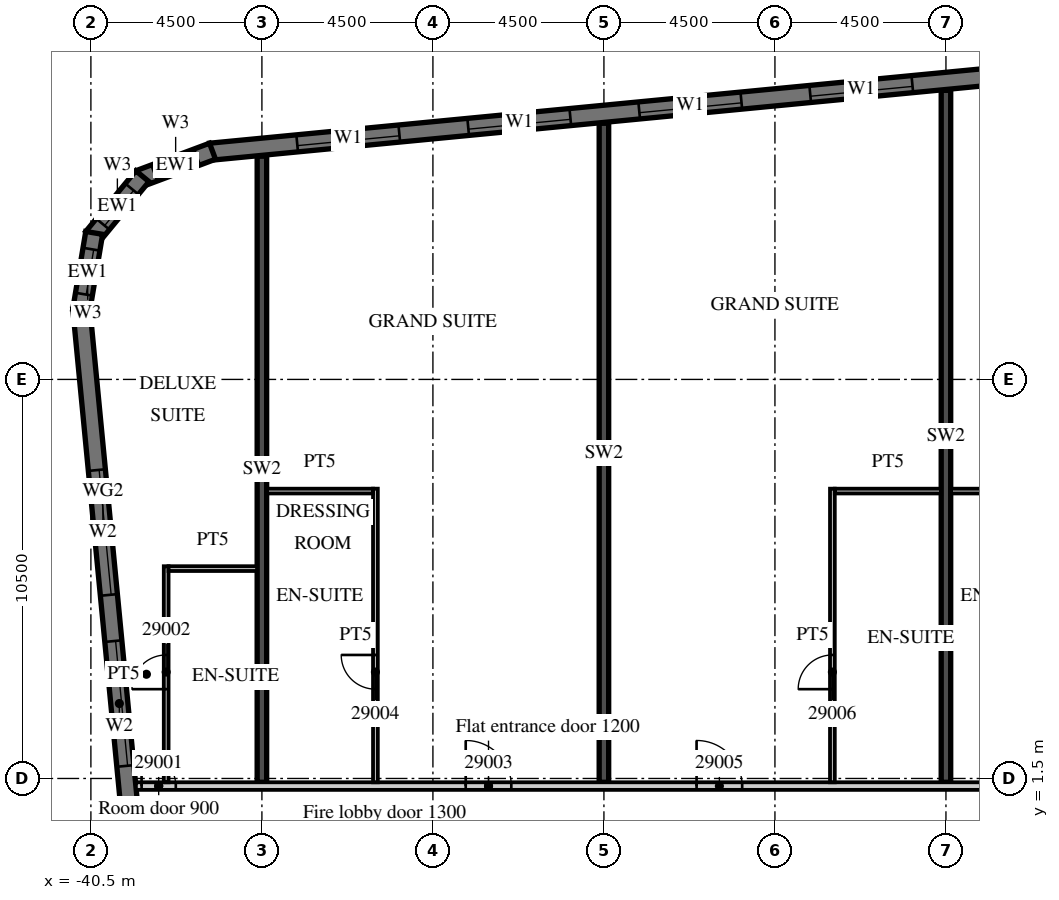
"""IFC4 building model, lengths in metres.
Left out: names, types, materials, properties, quantities, classifications, styles, units other than length and angle.
Written with IfcOpenShell. Run it as: python <this file> out.ifc"""

import sys

from ifc_helpers import new_model, si_unit, direction, frame, frame_2d, origin, place, context, subcontext, project, spatial, polyline, rectangle, outline, extrude, element, fill, save


model = new_model("IFC4")
c1 = context("Model", 3, precision=1e-05, world=origin(), true_north=direction((0.0, 1.0)))
c2 = subcontext(c1, "Body", "Model", "MODEL_VIEW")
j1 = project(units=[si_unit("LENGTHUNIT", "METRE"), si_unit("PLANEANGLEUNIT", "RADIAN")], contexts=[c1])
p1 = place(None, origin())
s1 = spatial("IfcSite", under=j1, at=p1, CompositionType="ELEMENT")
p2 = place(p1, origin())
s2 = spatial("IfcBuilding", under=s1, at=p2, CompositionType="ELEMENT")
p3 = place(p2, frame((0.0, 0.0, 130.6)))
s3 = spatial("IfcBuildingStorey", under=s2, at=p3, CompositionType="ELEMENT", Elevation=130.6)
p4 = place(p3, frame((-36.0, 1.4, 0.0), z_axis=(0.0, 0.0, 1.0), x_axis=(0.0, 1.0, 0.0)))
e1 = element("IfcWall", 1, at=p4, inside=s3, PredefinedType="SHEAR", context=c2, shape_type="SweptSolid", body=[
    extrude(rectangle(XDim=16.474, YDim=0.25, at=frame_2d((8.237, 0.0))), origin(), (0.0, 0.0, 1.0), 3.3),
])
p5 = place(p3, frame((-27.0, 1.4, 0.0), z_axis=(0.0, 0.0, 1.0), x_axis=(0.0, 1.0, 0.0)))
e2 = element("IfcWall", 2, at=p5, inside=s3, PredefinedType="SHEAR", context=c2, shape_type="SweptSolid", body=[
    extrude(rectangle(XDim=17.34, YDim=0.25, at=frame_2d((8.67, 0.0))), origin(), (0.0, 0.0, 1.0), 3.3),
])
p6 = place(p3, frame((-18.0, 1.4, 0.0), z_axis=(0.0, 0.0, 1.0), x_axis=(0.0, 1.0, 0.0)))
e3 = element("IfcWall", 3, at=p6, inside=s3, PredefinedType="SHEAR", context=c2, shape_type="SweptSolid", body=[
    extrude(rectangle(XDim=18.207, YDim=0.25, at=frame_2d((9.104, 0.0))), origin(), (0.0, 0.0, 1.0), 3.3),
])
p7 = place(p3, frame((-40.753, 13.872, 0.0), z_axis=(0.0, 0.0, 1.0), x_axis=(0.095843327381, -0.995396431878, 0.0)))
e4 = element("IfcWall", 4, at=p7, inside=s3, PredefinedType="SOLIDWALL", context=c2, shape_type="SweptSolid", body=[
    extrude(rectangle(XDim=35.0, YDim=0.45, at=frame_2d((17.5, 0.0))), origin(), (0.0, 0.0, 1.0), 3.02),
])
p8 = place(p7, frame((4.277, 0.0, 0.45)))
e5 = element("IfcOpeningElement", 5, at=p8, cuts=e4, PredefinedType="OPENING", context=c2, shape_type="SweptSolid", body=[
    extrude(rectangle(XDim=3.3, YDim=2.25, at=frame_2d((1.65, 1.125))), frame((0.0, 0.235, 0.0), z_axis=(0.0, -1.0, 0.0), x_axis=(1.0, 0.0, 0.0)), (0.0, 0.0, 1.0), 0.47),
])
p9 = place(p7, frame((8.798, 0.0, 0.45)))
e6 = element("IfcOpeningElement", 6, at=p9, cuts=e4, PredefinedType="OPENING", context=c2, shape_type="SweptSolid", body=[
    extrude(rectangle(XDim=3.3, YDim=2.25, at=frame_2d((1.65, 1.125))), frame((0.0, 0.235, 0.0), z_axis=(0.0, -1.0, 0.0), x_axis=(1.0, 0.0, 0.0)), (0.0, 0.0, 1.0), 0.47),
])
p10 = place(p3, frame((13.521, 22.89, 0.0), z_axis=(0.0, 0.0, 1.0), x_axis=(-0.995396445054, -0.095843190545, 0.0)))
e7 = element("IfcWall", 7, at=p10, inside=s3, PredefinedType="SOLIDWALL", context=c2, shape_type="SweptSolid", body=[
    extrude(rectangle(XDim=51.114, YDim=0.45, at=frame_2d((25.557, 0.0))), origin(), (0.0, 0.0, 1.0), 3.02),
])
p11 = place(p10, frame((0.91, 0.0, 0.45)))
e8 = element("IfcOpeningElement", 8, at=p11, cuts=e7, PredefinedType="OPENING", context=c2, shape_type="SweptSolid", body=[
    extrude(rectangle(XDim=2.7, YDim=2.25, at=frame_2d((1.35, 1.125))), frame((0.0, 0.235, 0.0), z_axis=(0.0, -1.0, 0.0), x_axis=(1.0, 0.0, 0.0)), (0.0, 0.0, 1.0), 0.47),
])
p12 = place(p10, frame((5.431, 0.0, 0.45)))
e9 = element("IfcOpeningElement", 9, at=p12, cuts=e7, PredefinedType="OPENING", context=c2, shape_type="SweptSolid", body=[
    extrude(rectangle(XDim=2.7, YDim=2.25, at=frame_2d((1.35, 1.125))), frame((0.0, 0.235, 0.0), z_axis=(0.0, -1.0, 0.0), x_axis=(1.0, 0.0, 0.0)), (0.0, 0.0, 1.0), 0.47),
])
p13 = place(p10, frame((9.952, 0.0, 0.45)))
e10 = element("IfcOpeningElement", 10, at=p13, cuts=e7, PredefinedType="OPENING", context=c2, shape_type="SweptSolid", body=[
    extrude(rectangle(XDim=2.7, YDim=2.25, at=frame_2d((1.35, 1.125))), frame((0.0, 0.235, 0.0), z_axis=(0.0, -1.0, 0.0), x_axis=(1.0, 0.0, 0.0)), (0.0, 0.0, 1.0), 0.47),
])
p14 = place(p10, frame((14.473, 0.0, 0.45)))
e11 = element("IfcOpeningElement", 11, at=p14, cuts=e7, PredefinedType="OPENING", context=c2, shape_type="SweptSolid", body=[
    extrude(rectangle(XDim=2.7, YDim=2.25, at=frame_2d((1.35, 1.125))), frame((0.0, 0.235, 0.0), z_axis=(0.0, -1.0, 0.0), x_axis=(1.0, 0.0, 0.0)), (0.0, 0.0, 1.0), 0.47),
])
p15 = place(p10, frame((18.994, 0.0, 0.45)))
e12 = element("IfcOpeningElement", 12, at=p15, cuts=e7, PredefinedType="OPENING", context=c2, shape_type="SweptSolid", body=[
    extrude(rectangle(XDim=2.7, YDim=2.25, at=frame_2d((1.35, 1.125))), frame((0.0, 0.235, 0.0), z_axis=(0.0, -1.0, 0.0), x_axis=(1.0, 0.0, 0.0)), (0.0, 0.0, 1.0), 0.47),
])
p16 = place(p10, frame((23.514, 0.0, 0.45)))
e13 = element("IfcOpeningElement", 13, at=p16, cuts=e7, PredefinedType="OPENING", context=c2, shape_type="SweptSolid", body=[
    extrude(rectangle(XDim=2.7, YDim=2.25, at=frame_2d((1.35, 1.125))), frame((0.0, 0.235, 0.0), z_axis=(0.0, -1.0, 0.0), x_axis=(1.0, 0.0, 0.0)), (0.0, 0.0, 1.0), 0.47),
])
p17 = place(p10, frame((28.035, 0.0, 0.45)))
e14 = element("IfcOpeningElement", 14, at=p17, cuts=e7, PredefinedType="OPENING", context=c2, shape_type="SweptSolid", body=[
    extrude(rectangle(XDim=2.7, YDim=2.25, at=frame_2d((1.35, 1.125))), frame((0.0, 0.235, 0.0), z_axis=(0.0, -1.0, 0.0), x_axis=(1.0, 0.0, 0.0)), (0.0, 0.0, 1.0), 0.47),
])
p18 = place(p10, frame((32.556, 0.0, 0.45)))
e15 = element("IfcOpeningElement", 15, at=p18, cuts=e7, PredefinedType="OPENING", context=c2, shape_type="SweptSolid", body=[
    extrude(rectangle(XDim=2.7, YDim=2.25, at=frame_2d((1.35, 1.125))), frame((0.0, 0.235, 0.0), z_axis=(0.0, -1.0, 0.0), x_axis=(1.0, 0.0, 0.0)), (0.0, 0.0, 1.0), 0.47),
])
p19 = place(p10, frame((37.077, 0.0, 0.45)))
e16 = element("IfcOpeningElement", 16, at=p19, cuts=e7, PredefinedType="OPENING", context=c2, shape_type="SweptSolid", body=[
    extrude(rectangle(XDim=2.7, YDim=2.25, at=frame_2d((1.35, 1.125))), frame((0.0, 0.235, 0.0), z_axis=(0.0, -1.0, 0.0), x_axis=(1.0, 0.0, 0.0)), (0.0, 0.0, 1.0), 0.47),
])
p20 = place(p10, frame((41.598, 0.0, 0.45)))
e17 = element("IfcOpeningElement", 17, at=p20, cuts=e7, PredefinedType="OPENING", context=c2, shape_type="SweptSolid", body=[
    extrude(rectangle(XDim=2.7, YDim=2.25, at=frame_2d((1.35, 1.125))), frame((0.0, 0.235, 0.0), z_axis=(0.0, -1.0, 0.0), x_axis=(1.0, 0.0, 0.0)), (0.0, 0.0, 1.0), 0.47),
])
p21 = place(p10, frame((46.118, 0.0, 0.45)))
e18 = element("IfcOpeningElement", 18, at=p21, cuts=e7, PredefinedType="OPENING", context=c2, shape_type="SweptSolid", body=[
    extrude(rectangle(XDim=2.7, YDim=2.25, at=frame_2d((1.35, 1.125))), frame((0.0, 0.235, 0.0), z_axis=(0.0, -1.0, 0.0), x_axis=(1.0, 0.0, 0.0)), (0.0, 0.0, 1.0), 0.47),
])
p22 = place(p3, frame((-37.3, 18.004, 0.0), z_axis=(0.0, 0.0, 1.0), x_axis=(-0.936677599948, -0.350192909346, 0.0)))
e19 = element("IfcWall", 19, at=p22, inside=s3, PredefinedType="SOLIDWALL", context=c2, shape_type="SweptSolid", body=[
    extrude(outline(polyline([(0.0, -0.225), (2.071, -0.225), (1.95, 0.225), (0.121, 0.225), (0.0, -0.225)])), origin(), (0.0, 0.0, 1.0), 3.02),
])
p23 = place(p22, frame((0.435, 0.0, 0.45)))
e20 = element("IfcOpeningElement", 20, at=p23, cuts=e19, PredefinedType="OPENING", context=c2, shape_type="SweptSolid", body=[
    extrude(rectangle(XDim=1.2, YDim=2.25, at=frame_2d((0.6, 1.125))), frame((0.0, 0.235, 0.0), z_axis=(0.0, -1.0, 0.0), x_axis=(1.0, 0.0, 0.0)), (0.0, 0.0, 1.0), 0.47),
])
p24 = place(p3, frame((-39.145, 17.347, 0.0), z_axis=(0.0, 0.0, 1.0), x_axis=(-0.636046112757, -0.771651049663, 0.0)))
e21 = element("IfcWall", 21, at=p24, inside=s3, PredefinedType="SOLIDWALL", context=c2, shape_type="SweptSolid", body=[
    extrude(outline(polyline([(0.0, -0.225), (2.071, -0.225), (1.95, 0.225), (0.121, 0.225), (0.0, -0.225)])), origin(), (0.0, 0.0, 1.0), 3.02),
])
p25 = place(p24, frame((0.435, 0.0, 0.45)))
e22 = element("IfcOpeningElement", 22, at=p25, cuts=e21, PredefinedType="OPENING", context=c2, shape_type="SweptSolid", body=[
    extrude(rectangle(XDim=1.2, YDim=2.25, at=frame_2d((0.6, 1.125))), frame((0.0, 0.235, 0.0), z_axis=(0.0, -1.0, 0.0), x_axis=(1.0, 0.0, 0.0)), (0.0, 0.0, 1.0), 0.47),
])
p26 = place(p3, frame((-40.413, 15.855, 0.0), z_axis=(0.0, 0.0, 1.0), x_axis=(-0.165068144653, -0.986282164302, 0.0)))
e23 = element("IfcWall", 23, at=p26, inside=s3, PredefinedType="SOLIDWALL", context=c2, shape_type="SweptSolid", body=[
    extrude(outline(polyline([(0.0, -0.225), (2.071, -0.225), (1.95, 0.225), (0.121, 0.225), (0.0, -0.225)])), origin(), (0.0, 0.0, 1.0), 3.02),
])
p27 = place(p26, frame((0.435, 0.0, 0.45)))
e24 = element("IfcOpeningElement", 24, at=p27, cuts=e23, PredefinedType="OPENING", context=c2, shape_type="SweptSolid", body=[
    extrude(rectangle(XDim=1.2, YDim=2.25, at=frame_2d((0.6, 1.125))), frame((0.0, 0.235, 0.0), z_axis=(0.0, -1.0, 0.0), x_axis=(1.0, 0.0, 0.0)), (0.0, 0.0, 1.0), 0.47),
])
p28 = place(p3, frame((-39.316, 1.3, 0.0), z_axis=(0.0, 0.0, 1.0), x_axis=(1.0, 0.0, 0.0)))
e25 = element("IfcWall", 25, at=p28, inside=s3, PredefinedType="PARTITIONING", context=c2, shape_type="SweptSolid", body=[
    extrude(rectangle(XDim=52.816, YDim=0.2, at=frame_2d((26.408, 0.0))), origin(), (0.0, 0.0, 1.0), 3.02),
])
p29 = place(p28, frame((0.15, 0.0, 0.0)))
e26 = element("IfcOpeningElement", 26, at=p29, cuts=e25, PredefinedType="OPENING", context=c2, shape_type="SweptSolid", body=[
    extrude(rectangle(XDim=0.9, YDim=2.1, at=frame_2d((0.45, 1.05))), frame((0.0, 0.11, 0.0), z_axis=(0.0, -1.0, 0.0), x_axis=(1.0, 0.0, 0.0)), (0.0, 0.0, 1.0), 0.22),
])
p30 = place(p28, frame((8.679, 0.0, 0.0)))
e27 = element("IfcOpeningElement", 27, at=p30, cuts=e25, PredefinedType="OPENING", context=c2, shape_type="SweptSolid", body=[
    extrude(rectangle(XDim=1.2, YDim=2.1, at=frame_2d((0.6, 1.05))), frame((0.0, 0.11, 0.0), z_axis=(0.0, -1.0, 0.0), x_axis=(1.0, 0.0, 0.0)), (0.0, 0.0, 1.0), 0.22),
])
p31 = place(p28, frame((14.754, 0.0, 0.0)))
e28 = element("IfcOpeningElement", 28, at=p31, cuts=e25, PredefinedType="OPENING", context=c2, shape_type="SweptSolid", body=[
    extrude(rectangle(XDim=1.2, YDim=2.1, at=frame_2d((0.6, 1.05))), frame((0.0, 0.11, 0.0), z_axis=(0.0, -1.0, 0.0), x_axis=(1.0, 0.0, 0.0)), (0.0, 0.0, 1.0), 0.22),
])
p32 = place(p28, frame((26.678, 0.0, 0.0)))
e29 = element("IfcOpeningElement", 29, at=p32, cuts=e25, PredefinedType="OPENING", context=c2, shape_type="SweptSolid", body=[
    extrude(rectangle(XDim=1.2, YDim=2.1, at=frame_2d((0.6, 1.05))), frame((0.0, 0.11, 0.0), z_axis=(0.0, -1.0, 0.0), x_axis=(1.0, 0.0, 0.0)), (0.0, 0.0, 1.0), 0.22),
])
p33 = place(p28, frame((33.266, 0.0, 0.0)))
e30 = element("IfcOpeningElement", 30, at=p33, cuts=e25, PredefinedType="OPENING", context=c2, shape_type="SweptSolid", body=[
    extrude(rectangle(XDim=1.0, YDim=2.1, at=frame_2d((0.5, 1.05))), frame((0.0, 0.11, 0.0), z_axis=(0.0, -1.0, 0.0), x_axis=(1.0, 0.0, 0.0)), (0.0, 0.0, 1.0), 0.22),
])
p34 = place(p28, frame((37.741, 0.0, 0.0)))
e31 = element("IfcOpeningElement", 31, at=p34, cuts=e25, PredefinedType="OPENING", context=c2, shape_type="SweptSolid", body=[
    extrude(rectangle(XDim=1.0, YDim=2.1, at=frame_2d((0.5, 1.05))), frame((0.0, 0.11, 0.0), z_axis=(0.0, -1.0, 0.0), x_axis=(1.0, 0.0, 0.0)), (0.0, 0.0, 1.0), 0.22),
])
p35 = place(p28, frame((41.754, 0.0, 0.0)))
e32 = element("IfcOpeningElement", 32, at=p35, cuts=e25, PredefinedType="OPENING", context=c2, shape_type="SweptSolid", body=[
    extrude(rectangle(XDim=1.2, YDim=2.1, at=frame_2d((0.6, 1.05))), frame((0.0, 0.11, 0.0), z_axis=(0.0, -1.0, 0.0), x_axis=(1.0, 0.0, 0.0)), (0.0, 0.0, 1.0), 0.22),
])
p36 = place(p28, frame((51.241, 0.0, 0.0)))
e33 = element("IfcOpeningElement", 33, at=p36, cuts=e25, PredefinedType="OPENING", context=c2, shape_type="SweptSolid", body=[
    extrude(rectangle(XDim=1.0, YDim=2.1, at=frame_2d((0.5, 1.05))), frame((0.0, 0.11, 0.0), z_axis=(0.0, -1.0, 0.0), x_axis=(1.0, 0.0, 0.0)), (0.0, 0.0, 1.0), 0.22),
])
p37 = place(p3, frame((-38.519, 1.4, 0.0), z_axis=(0.0, 0.0, 1.0), x_axis=(0.0, 1.0, 0.0)))
e34 = element("IfcWall", 34, at=p37, inside=s3, PredefinedType="PARTITIONING", context=c2, shape_type="SweptSolid", body=[
    extrude(rectangle(XDim=5.684, YDim=0.125, at=frame_2d((2.842, 0.0))), origin(), (0.0, 0.0, 1.0), 3.02),
])
p38 = place(p37, frame((2.45, 0.0, 0.0)))
e35 = element("IfcOpeningElement", 35, at=p38, cuts=e34, PredefinedType="OPENING", context=c2, shape_type="SweptSolid", body=[
    extrude(rectangle(XDim=0.9, YDim=2.1, at=frame_2d((0.45, 1.05))), frame((0.0, 0.073, 0.0), z_axis=(0.0, -1.0, 0.0), x_axis=(1.0, 0.0, 0.0)), (0.0, 0.0, 1.0), 0.145),
])
p39 = place(p3, frame((-38.457, 7.022, 0.0), z_axis=(0.0, 0.0, 1.0), x_axis=(1.0, 0.0, 0.0)))
e36 = element("IfcWall", 36, at=p39, inside=s3, PredefinedType="PARTITIONING", context=c2, shape_type="SweptSolid", body=[
    extrude(rectangle(XDim=2.332, YDim=0.125, at=frame_2d((1.166, 0.0))), origin(), (0.0, 0.0, 1.0), 3.02),
])
p40 = place(p3, frame((-33.013, 1.4, 0.0), z_axis=(0.0, 0.0, 1.0), x_axis=(0.0, 1.0, 0.0)))
e37 = element("IfcWall", 37, at=p40, inside=s3, PredefinedType="PARTITIONING", context=c2, shape_type="SweptSolid", body=[
    extrude(rectangle(XDim=7.725, YDim=0.125, at=frame_2d((3.863, 0.0))), origin(), (0.0, 0.0, 1.0), 3.02),
])
p41 = place(p40, frame((2.45, 0.0, 0.0)))
e38 = element("IfcOpeningElement", 38, at=p41, cuts=e37, PredefinedType="OPENING", context=c2, shape_type="SweptSolid", body=[
    extrude(rectangle(XDim=0.9, YDim=2.1, at=frame_2d((0.45, 1.05))), frame((0.0, 0.073, 0.0), z_axis=(0.0, -1.0, 0.0), x_axis=(1.0, 0.0, 0.0)), (0.0, 0.0, 1.0), 0.145),
])
p42 = place(p3, frame((-35.875, 9.062, 0.0), z_axis=(0.0, 0.0, 1.0), x_axis=(1.0, 0.0, 0.0)))
e39 = element("IfcWall", 39, at=p42, inside=s3, PredefinedType="PARTITIONING", context=c2, shape_type="SweptSolid", body=[
    extrude(rectangle(XDim=2.8, YDim=0.125, at=frame_2d((1.4, 0.0))), origin(), (0.0, 0.0, 1.0), 3.02),
])
p43 = place(p3, frame((-20.988, 1.4, 0.0), z_axis=(0.0, 0.0, 1.0), x_axis=(0.0, 1.0, 0.0)))
e40 = element("IfcWall", 40, at=p43, inside=s3, PredefinedType="PARTITIONING", context=c2, shape_type="SweptSolid", body=[
    extrude(rectangle(XDim=7.725, YDim=0.125, at=frame_2d((3.863, 0.0))), origin(), (0.0, 0.0, 1.0), 3.02),
])
p44 = place(p43, frame((2.45, 0.0, 0.0)))
e41 = element("IfcOpeningElement", 41, at=p44, cuts=e40, PredefinedType="OPENING", context=c2, shape_type="SweptSolid", body=[
    extrude(rectangle(XDim=0.9, YDim=2.1, at=frame_2d((0.45, 1.05))), frame((0.0, 0.073, 0.0), z_axis=(0.0, -1.0, 0.0), x_axis=(1.0, 0.0, 0.0)), (0.0, 0.0, 1.0), 0.145),
])
for number, where, z_axis, x_axis in (
    (42, (-20.925, 9.062, 0.0), (0.0, 0.0, 1.0), (1.0, 0.0, 0.0)),
    (43, (-17.875, 9.062, 0.0), (0.0, 0.0, 1.0), (1.0, 0.0, 0.0)),
):
    element("IfcWall", number, at=place(p3, frame(where, z_axis=z_axis, x_axis=x_axis)), inside=s3, PredefinedType="PARTITIONING", context=c2, shape_type="SweptSolid", body=[
        extrude(rectangle(XDim=2.8, YDim=0.125, at=frame_2d((1.4, 0.0))), origin(), (0.0, 0.0, 1.0), 3.02),
    ])
p45 = place(p8, origin())
e44 = element("IfcWindow", 44, at=p45, inside=s3, PartitioningType="SINGLE_PANEL", PredefinedType="WINDOW", context=c2, shape_type="SweptSolid", body=[
    extrude(rectangle(XDim=3.3, YDim=2.25, at=frame_2d((1.65, 1.125))), frame((0.0, 0.09, 0.0), z_axis=(0.0, -1.0, 0.0), x_axis=(1.0, 0.0, 0.0)), (0.0, 0.0, 1.0), 0.06),
])
fill(e5, e44)
p46 = place(p9, origin())
e45 = element("IfcWindow", 45, at=p46, inside=s3, PartitioningType="SINGLE_PANEL", PredefinedType="WINDOW", context=c2, shape_type="SweptSolid", body=[
    extrude(rectangle(XDim=3.3, YDim=2.25, at=frame_2d((1.65, 1.125))), frame((0.0, 0.09, 0.0), z_axis=(0.0, -1.0, 0.0), x_axis=(1.0, 0.0, 0.0)), (0.0, 0.0, 1.0), 0.06),
])
fill(e6, e45)
p47 = place(p18, origin())
e46 = element("IfcWindow", 46, at=p47, inside=s3, PartitioningType="SINGLE_PANEL", PredefinedType="WINDOW", context=c2, shape_type="SweptSolid", body=[
    extrude(rectangle(XDim=2.7, YDim=2.25, at=frame_2d((1.35, 1.125))), frame((0.0, 0.09, 0.0), z_axis=(0.0, -1.0, 0.0), x_axis=(1.0, 0.0, 0.0)), (0.0, 0.0, 1.0), 0.06),
])
fill(e15, e46)
p48 = place(p19, origin())
e47 = element("IfcWindow", 47, at=p48, inside=s3, PartitioningType="SINGLE_PANEL", PredefinedType="WINDOW", context=c2, shape_type="SweptSolid", body=[
    extrude(rectangle(XDim=2.7, YDim=2.25, at=frame_2d((1.35, 1.125))), frame((0.0, 0.09, 0.0), z_axis=(0.0, -1.0, 0.0), x_axis=(1.0, 0.0, 0.0)), (0.0, 0.0, 1.0), 0.06),
])
fill(e16, e47)
p49 = place(p20, origin())
e48 = element("IfcWindow", 48, at=p49, inside=s3, PartitioningType="SINGLE_PANEL", PredefinedType="WINDOW", context=c2, shape_type="SweptSolid", body=[
    extrude(rectangle(XDim=2.7, YDim=2.25, at=frame_2d((1.35, 1.125))), frame((0.0, 0.09, 0.0), z_axis=(0.0, -1.0, 0.0), x_axis=(1.0, 0.0, 0.0)), (0.0, 0.0, 1.0), 0.06),
])
fill(e17, e48)
p50 = place(p21, origin())
e49 = element("IfcWindow", 49, at=p50, inside=s3, PartitioningType="SINGLE_PANEL", PredefinedType="WINDOW", context=c2, shape_type="SweptSolid", body=[
    extrude(rectangle(XDim=2.7, YDim=2.25, at=frame_2d((1.35, 1.125))), frame((0.0, 0.09, 0.0), z_axis=(0.0, -1.0, 0.0), x_axis=(1.0, 0.0, 0.0)), (0.0, 0.0, 1.0), 0.06),
])
fill(e18, e49)
p51 = place(p23, origin())
e50 = element("IfcWindow", 50, at=p51, inside=s3, PartitioningType="SINGLE_PANEL", PredefinedType="WINDOW", context=c2, shape_type="SweptSolid", body=[
    extrude(rectangle(XDim=1.2, YDim=2.25, at=frame_2d((0.6, 1.125))), frame((0.0, 0.09, 0.0), z_axis=(0.0, -1.0, 0.0), x_axis=(1.0, 0.0, 0.0)), (0.0, 0.0, 1.0), 0.06),
])
fill(e20, e50)
p52 = place(p25, origin())
e51 = element("IfcWindow", 51, at=p52, inside=s3, PartitioningType="SINGLE_PANEL", PredefinedType="WINDOW", context=c2, shape_type="SweptSolid", body=[
    extrude(rectangle(XDim=1.2, YDim=2.25, at=frame_2d((0.6, 1.125))), frame((0.0, 0.09, 0.0), z_axis=(0.0, -1.0, 0.0), x_axis=(1.0, 0.0, 0.0)), (0.0, 0.0, 1.0), 0.06),
])
fill(e22, e51)
p53 = place(p27, origin())
e52 = element("IfcWindow", 52, at=p53, inside=s3, PartitioningType="SINGLE_PANEL", PredefinedType="WINDOW", context=c2, shape_type="SweptSolid", body=[
    extrude(rectangle(XDim=1.2, YDim=2.25, at=frame_2d((0.6, 1.125))), frame((0.0, 0.09, 0.0), z_axis=(0.0, -1.0, 0.0), x_axis=(1.0, 0.0, 0.0)), (0.0, 0.0, 1.0), 0.06),
])
fill(e24, e52)
p54 = place(p29, origin())
e53 = element("IfcDoor", 53, at=p54, inside=s3, OperationType="SINGLE_SWING_LEFT", PredefinedType="DOOR", context=c2, shape_type="SweptSolid", body=[
    extrude(rectangle(XDim=0.9, YDim=2.1, at=frame_2d((0.45, 1.05))), frame((0.0, 0.025, 0.0), z_axis=(0.0, -1.0, 0.0), x_axis=(1.0, 0.0, 0.0)), (0.0, 0.0, 1.0), 0.05),
])
fill(e26, e53)
p55 = place(p38, origin())
e54 = element("IfcDoor", 54, at=p55, inside=s3, OperationType="SINGLE_SWING_LEFT", PredefinedType="DOOR", context=c2, shape_type="SweptSolid", body=[
    extrude(rectangle(XDim=0.9, YDim=2.1, at=frame_2d((0.45, 1.05))), frame((0.0, 0.025, 0.0), z_axis=(0.0, -1.0, 0.0), x_axis=(1.0, 0.0, 0.0)), (0.0, 0.0, 1.0), 0.05),
])
fill(e35, e54)
p56 = place(p30, origin())
e55 = element("IfcDoor", 55, at=p56, inside=s3, OperationType="SINGLE_SWING_LEFT", PredefinedType="DOOR", context=c2, shape_type="SweptSolid", body=[
    extrude(rectangle(XDim=1.2, YDim=2.1, at=frame_2d((0.6, 1.05))), frame((0.0, 0.025, 0.0), z_axis=(0.0, -1.0, 0.0), x_axis=(1.0, 0.0, 0.0)), (0.0, 0.0, 1.0), 0.05),
])
fill(e27, e55)
p57 = place(p41, origin())
e56 = element("IfcDoor", 56, at=p57, inside=s3, OperationType="SINGLE_SWING_RIGHT", PredefinedType="DOOR", context=c2, shape_type="SweptSolid", body=[
    extrude(rectangle(XDim=0.9, YDim=2.1, at=frame_2d((0.45, 1.05))), frame((0.0, 0.025, 0.0), z_axis=(0.0, -1.0, 0.0), x_axis=(1.0, 0.0, 0.0)), (0.0, 0.0, 1.0), 0.05),
])
fill(e38, e56)
p58 = place(p31, origin())
e57 = element("IfcDoor", 57, at=p58, inside=s3, OperationType="SINGLE_SWING_LEFT", PredefinedType="DOOR", context=c2, shape_type="SweptSolid", body=[
    extrude(rectangle(XDim=1.2, YDim=2.1, at=frame_2d((0.6, 1.05))), frame((0.0, 0.025, 0.0), z_axis=(0.0, -1.0, 0.0), x_axis=(1.0, 0.0, 0.0)), (0.0, 0.0, 1.0), 0.05),
])
fill(e28, e57)
p59 = place(p44, origin())
e58 = element("IfcDoor", 58, at=p59, inside=s3, OperationType="SINGLE_SWING_LEFT", PredefinedType="DOOR", context=c2, shape_type="SweptSolid", body=[
    extrude(rectangle(XDim=0.9, YDim=2.1, at=frame_2d((0.45, 1.05))), frame((0.0, 0.025, 0.0), z_axis=(0.0, -1.0, 0.0), x_axis=(1.0, 0.0, 0.0)), (0.0, 0.0, 1.0), 0.05),
])
fill(e41, e58)
save(model, sys.argv[1])
